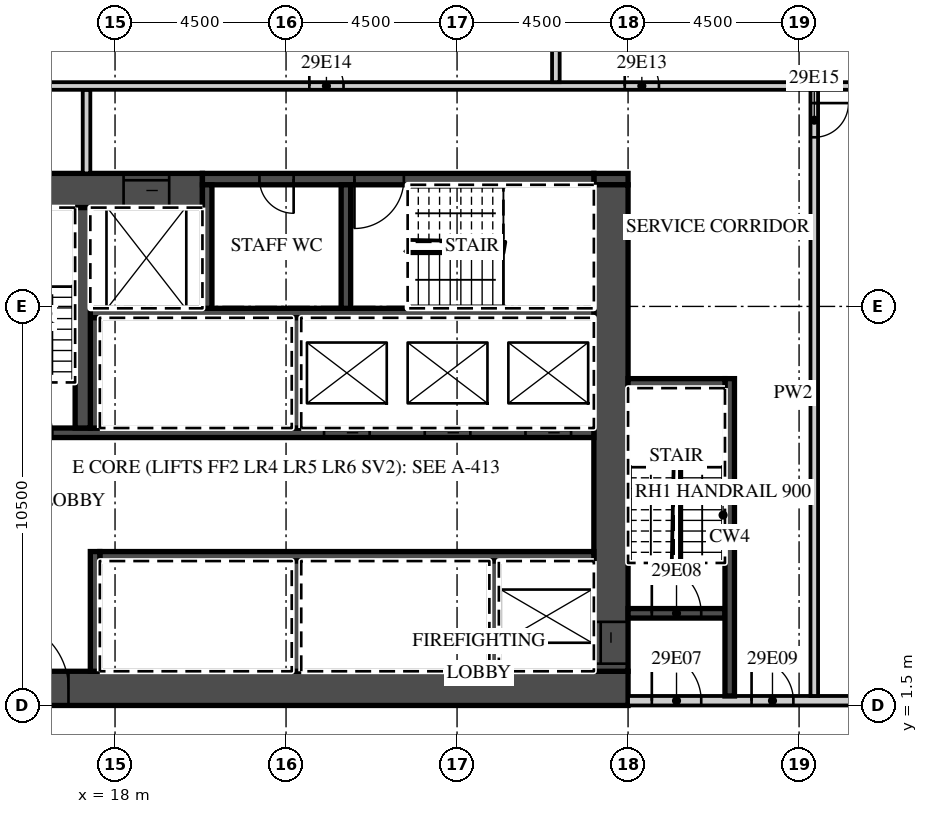
"""IFC4 building model, lengths in metres.
Left out: names, types, materials, properties, quantities, classifications, styles, units other than length and angle.
Written with IfcOpenShell. Run it as: python <this file> out.ifc"""

import sys

from ifc_helpers import new_model, si_unit, direction, frame, frame_2d, origin, place, context, subcontext, project, spatial, rectangle, extrude, element, fill, save


model = new_model("IFC4")
c1 = context("Model", 3, precision=1e-05, world=origin(), true_north=direction((0.0, 1.0)))
c2 = subcontext(c1, "Body", "Model", "MODEL_VIEW")
j1 = project(units=[si_unit("LENGTHUNIT", "METRE"), si_unit("PLANEANGLEUNIT", "RADIAN")], contexts=[c1])
p1 = place(None, origin())
s1 = spatial("IfcSite", under=j1, at=p1, CompositionType="ELEMENT")
p2 = place(p1, origin())
s2 = spatial("IfcBuilding", under=s1, at=p2, CompositionType="ELEMENT")
p3 = place(p2, frame((0.0, 0.0, 130.6)))
s3 = spatial("IfcBuildingStorey", under=s2, at=p3, CompositionType="ELEMENT", Elevation=130.6)
p4 = place(p3, frame((13.5, 1.95, 0.0), z_axis=(0.0, 0.0, 1.0), x_axis=(1.0, 0.0, 0.0)))
e1 = element("IfcWall", 1, at=p4, inside=s3, PredefinedType="SHEAR", context=c2, shape_type="SweptSolid", body=[
    extrude(rectangle(XDim=18.0, YDim=0.9, at=frame_2d((9.0, 0.0))), origin(), (0.0, 0.0, 1.0), 3.02),
])
p5 = place(p4, frame((1.475, 0.0, 0.0)))
e2 = element("IfcOpeningElement", 2, at=p5, cuts=e1, PredefinedType="OPENING", context=c2, shape_type="SweptSolid", body=[
    extrude(rectangle(XDim=1.8, YDim=2.1, at=frame_2d((0.9, 1.05))), frame((0.0, 0.46, 0.0), z_axis=(0.0, -1.0, 0.0), x_axis=(1.0, 0.0, 0.0)), (0.0, 0.0, 1.0), 0.92),
])
p6 = place(p3, frame((13.5, 15.05, 0.0), z_axis=(0.0, 0.0, 1.0), x_axis=(1.0, 0.0, 0.0)))
e3 = element("IfcWall", 3, at=p6, inside=s3, PredefinedType="SHEAR", context=c2, shape_type="SweptSolid", body=[
    extrude(rectangle(XDim=6.8, YDim=0.9, at=frame_2d((3.4, 0.0))), origin(), (0.0, 0.0, 1.0), 3.02),
])
p7 = place(p6, frame((4.725, 0.0, 0.0)))
e4 = element("IfcOpeningElement", 4, at=p7, cuts=e3, PredefinedType="OPENING", context=c2, shape_type="SweptSolid", body=[
    extrude(rectangle(XDim=1.2, YDim=2.1, at=frame_2d((0.6, 1.05))), frame((0.0, 0.46, 0.0), z_axis=(0.0, -1.0, 0.0), x_axis=(1.0, 0.0, 0.0)), (0.0, 0.0, 1.0), 0.92),
])
p8 = place(p3, frame((30.6, 15.35, 0.0), z_axis=(0.0, 0.0, 1.0), x_axis=(1.0, 0.0, 0.0)))
e5 = element("IfcWall", 5, at=p8, inside=s3, PredefinedType="SHEAR", context=c2, shape_type="SweptSolid", body=[
    extrude(rectangle(XDim=0.9, YDim=0.3, at=frame_2d((0.45, 0.0))), origin(), (0.0, 0.0, 1.0), 3.02),
])
p9 = place(p3, frame((20.3, 15.35, 0.0), z_axis=(0.0, 0.0, 1.0), x_axis=(1.0, 0.0, 0.0)))
e6 = element("IfcWall", 6, at=p9, inside=s3, PredefinedType="SHEAR", context=c2, shape_type="SweptSolid", body=[
    extrude(rectangle(XDim=10.3, YDim=0.3, at=frame_2d((5.15, 0.0))), origin(), (0.0, 0.0, 1.0), 3.02),
])
p10 = place(p9, frame((4.0, 0.0, 0.0)))
e7 = element("IfcOpeningElement", 7, at=p10, cuts=e6, PredefinedType="OPENING", context=c2, shape_type="SweptSolid", body=[
    extrude(rectangle(XDim=1.3, YDim=2.1, at=frame_2d((0.65, 1.05))), frame((0.0, 0.16, 0.0), z_axis=(0.0, -1.0, 0.0), x_axis=(1.0, 0.0, 0.0)), (0.0, 0.0, 1.0), 0.32),
])
p11 = place(p9, frame((1.5, 0.0, 0.0)))
e8 = element("IfcOpeningElement", 8, at=p11, cuts=e6, PredefinedType="OPENING", context=c2, shape_type="SweptSolid", body=[
    extrude(rectangle(XDim=0.9, YDim=2.1, at=frame_2d((0.45, 1.05))), frame((0.0, 0.16, 0.0), z_axis=(0.0, -1.0, 0.0), x_axis=(1.0, 0.0, 0.0)), (0.0, 0.0, 1.0), 0.32),
])
p12 = place(p3, frame((31.05, 2.4, 0.0), z_axis=(0.0, 0.0, 1.0), x_axis=(0.0, 1.0, 0.0)))
e9 = element("IfcWall", 9, at=p12, inside=s3, PredefinedType="SHEAR", context=c2, shape_type="SweptSolid", body=[
    extrude(rectangle(XDim=12.8, YDim=0.9, at=frame_2d((6.4, 0.0))), origin(), (0.0, 0.0, 1.0), 3.02),
])
p13 = place(p12, frame((0.2, 0.0, 0.0)))
e10 = element("IfcOpeningElement", 10, at=p13, cuts=e9, PredefinedType="OPENING", context=c2, shape_type="SweptSolid", body=[
    extrude(rectangle(XDim=1.1, YDim=2.1, at=frame_2d((0.55, 1.05))), frame((0.0, 0.46, 0.0), z_axis=(0.0, -1.0, 0.0), x_axis=(1.0, 0.0, 0.0)), (0.0, 0.0, 1.0), 0.92),
])
p14 = place(p3, frame((17.6, 5.425, 0.0), z_axis=(0.0, 0.0, 1.0), x_axis=(1.0, 0.0, 0.0)))
e11 = element("IfcWall", 11, at=p14, inside=s3, PredefinedType="SHEAR", context=c2, shape_type="SweptSolid", body=[
    extrude(rectangle(XDim=13.0, YDim=0.25, at=frame_2d((6.5, 0.0))), origin(), (0.0, 0.0, 1.0), 3.02),
])
p15 = place(p3, frame((17.475, 2.4, 0.0), z_axis=(0.0, 0.0, 1.0), x_axis=(0.0, 1.0, 0.0)))
e12 = element("IfcWall", 12, at=p15, inside=s3, PredefinedType="SHEAR", context=c2, shape_type="SweptSolid", body=[
    extrude(rectangle(XDim=3.15, YDim=0.25, at=frame_2d((1.575, 0.0))), origin(), (0.0, 0.0, 1.0), 3.02),
])
for number, where, z_axis, x_axis in (
    (13, (27.975, 2.4, 0.0), (0.0, 0.0, 1.0), (0.0, 1.0, 0.0)),
    (14, (22.775, 2.4, 0.0), (0.0, 0.0, 1.0), (0.0, 1.0, 0.0)),
):
    element("IfcWall", number, at=place(p3, frame(where, z_axis=z_axis, x_axis=x_axis)), inside=s3, PredefinedType="SHEAR", context=c2, shape_type="SweptSolid", body=[
        extrude(rectangle(XDim=2.9, YDim=0.25, at=frame_2d((1.45, 0.0))), origin(), (0.0, 0.0, 1.0), 3.02),
    ])
p16 = place(p3, frame((14.4, 8.675, 0.0), z_axis=(0.0, 0.0, 1.0), x_axis=(1.0, 0.0, 0.0)))
e15 = element("IfcWall", 15, at=p16, inside=s3, PredefinedType="SHEAR", context=c2, shape_type="SweptSolid", body=[
    extrude(rectangle(XDim=16.2, YDim=0.25, at=frame_2d((8.1, 0.0))), origin(), (0.0, 0.0, 1.0), 3.02),
])
p17 = place(p16, frame((14.4, 0.0, 0.0)))
e16 = element("IfcOpeningElement", 16, at=p17, cuts=e15, PredefinedType="OPENING", context=c2, shape_type="SweptSolid", body=[
    extrude(rectangle(XDim=1.2, YDim=2.1, at=frame_2d((0.6, 1.05))), frame((0.0, 0.135, 0.0), z_axis=(0.0, -1.0, 0.0), x_axis=(1.0, 0.0, 0.0)), (0.0, 0.0, 1.0), 0.27),
])
p18 = place(p16, frame((11.75, 0.0, 0.0)))
e17 = element("IfcOpeningElement", 17, at=p18, cuts=e15, PredefinedType="OPENING", context=c2, shape_type="SweptSolid", body=[
    extrude(rectangle(XDim=1.2, YDim=2.1, at=frame_2d((0.6, 1.05))), frame((0.0, 0.135, 0.0), z_axis=(0.0, -1.0, 0.0), x_axis=(1.0, 0.0, 0.0)), (0.0, 0.0, 1.0), 0.27),
])
p19 = place(p16, frame((9.1, 0.0, 0.0)))
e18 = element("IfcOpeningElement", 18, at=p19, cuts=e15, PredefinedType="OPENING", context=c2, shape_type="SweptSolid", body=[
    extrude(rectangle(XDim=1.2, YDim=2.1, at=frame_2d((0.6, 1.05))), frame((0.0, 0.135, 0.0), z_axis=(0.0, -1.0, 0.0), x_axis=(1.0, 0.0, 0.0)), (0.0, 0.0, 1.0), 0.27),
])
p20 = place(p16, frame((0.65, 0.0, 0.0)))
e19 = element("IfcOpeningElement", 19, at=p20, cuts=e15, PredefinedType="OPENING", context=c2, shape_type="SweptSolid", body=[
    extrude(rectangle(XDim=1.3, YDim=2.1, at=frame_2d((0.65, 1.05))), frame((0.0, 0.135, 0.0), z_axis=(0.0, -1.0, 0.0), x_axis=(1.0, 0.0, 0.0)), (0.0, 0.0, 1.0), 0.27),
])
p21 = place(p3, frame((17.35, 11.825, 0.0), z_axis=(0.0, 0.0, 1.0), x_axis=(1.0, 0.0, 0.0)))
e20 = element("IfcWall", 20, at=p21, inside=s3, PredefinedType="SHEAR", context=c2, shape_type="SweptSolid", body=[
    extrude(rectangle(XDim=13.25, YDim=0.25, at=frame_2d((6.625, 0.0))), origin(), (0.0, 0.0, 1.0), 3.02),
])
for number, where, z_axis, x_axis in (
    (21, (17.475, 8.8, 0.0), (0.0, 0.0, 1.0), (0.0, 1.0, 0.0)),
    (22, (22.775, 8.8, 0.0), (0.0, 0.0, 1.0), (0.0, 1.0, 0.0)),
):
    element("IfcWall", number, at=place(p3, frame(where, z_axis=z_axis, x_axis=x_axis)), inside=s3, PredefinedType="SHEAR", context=c2, shape_type="SweptSolid", body=[
        extrude(rectangle(XDim=2.9, YDim=0.25, at=frame_2d((1.45, 0.0))), origin(), (0.0, 0.0, 1.0), 3.02),
    ])
p22 = place(p3, frame((17.15, 8.8, 0.0), z_axis=(0.0, 0.0, 1.0), x_axis=(0.0, 1.0, 0.0)))
e23 = element("IfcWall", 23, at=p22, inside=s3, PredefinedType="SHEAR", context=c2, shape_type="SweptSolid", body=[
    extrude(rectangle(XDim=5.8, YDim=0.4, at=frame_2d((2.9, 0.0))), origin(), (0.0, 0.0, 1.0), 3.02),
])
for number, where, z_axis, x_axis in (
    (24, (20.425, 11.95, 0.0), (0.0, 0.0, 1.0), (0.0, 1.0, 0.0)),
    (25, (24.075, 11.95, 0.0), (0.0, 0.0, 1.0), (0.0, 1.0, 0.0)),
):
    element("IfcWall", number, at=place(p3, frame(where, z_axis=z_axis, x_axis=x_axis)), inside=s3, PredefinedType="SHEAR", context=c2, shape_type="SweptSolid", body=[
        extrude(rectangle(XDim=3.25, YDim=0.25, at=frame_2d((1.625, 0.0))), origin(), (0.0, 0.0, 1.0), 3.02),
    ])
p23 = place(p3, frame((31.5, 1.625, 0.0), z_axis=(0.0, 0.0, 1.0), x_axis=(1.0, 0.0, 0.0)))
e26 = element("IfcWall", 26, at=p23, inside=s3, PredefinedType="PARTITIONING", context=c2, shape_type="SweptSolid", body=[
    extrude(rectangle(XDim=15.65, YDim=0.25, at=frame_2d((7.825, 0.0))), origin(), (0.0, 0.0, 1.0), 3.02),
])
p24 = place(p23, frame((0.625, 0.0, 0.0)))
e27 = element("IfcOpeningElement", 27, at=p24, cuts=e26, PredefinedType="OPENING", context=c2, shape_type="SweptSolid", body=[
    extrude(rectangle(XDim=1.3, YDim=2.1, at=frame_2d((0.65, 1.05))), frame((0.0, 0.135, 0.0), z_axis=(0.0, -1.0, 0.0), x_axis=(1.0, 0.0, 0.0)), (0.0, 0.0, 1.0), 0.27),
])
p25 = place(p23, frame((3.25, 0.0, 0.0)))
e28 = element("IfcOpeningElement", 28, at=p25, cuts=e26, PredefinedType="OPENING", context=c2, shape_type="SweptSolid", body=[
    extrude(rectangle(XDim=1.1, YDim=2.1, at=frame_2d((0.55, 1.05))), frame((0.0, 0.135, 0.0), z_axis=(0.0, -1.0, 0.0), x_axis=(1.0, 0.0, 0.0)), (0.0, 0.0, 1.0), 0.27),
])
p26 = place(p3, frame((31.5, 3.925, 0.0), z_axis=(0.0, 0.0, 1.0), x_axis=(1.0, 0.0, 0.0)))
e29 = element("IfcWall", 29, at=p26, inside=s3, PredefinedType="SHEAR", context=c2, shape_type="SweptSolid", body=[
    extrude(rectangle(XDim=2.55, YDim=0.25, at=frame_2d((1.275, 0.0))), origin(), (0.0, 0.0, 1.0), 3.02),
])
p27 = place(p26, frame((0.625, 0.0, 0.0)))
e30 = element("IfcOpeningElement", 30, at=p27, cuts=e29, PredefinedType="OPENING", context=c2, shape_type="SweptSolid", body=[
    extrude(rectangle(XDim=1.3, YDim=2.1, at=frame_2d((0.65, 1.05))), frame((0.0, 0.135, 0.0), z_axis=(0.0, -1.0, 0.0), x_axis=(1.0, 0.0, 0.0)), (0.0, 0.0, 1.0), 0.27),
])
p28 = place(p3, frame((34.175, 1.75, 0.0), z_axis=(0.0, 0.0, 1.0), x_axis=(0.0, 1.0, 0.0)))
e31 = element("IfcWall", 31, at=p28, inside=s3, PredefinedType="SHEAR", context=c2, shape_type="SweptSolid", body=[
    extrude(rectangle(XDim=8.35, YDim=0.25, at=frame_2d((4.175, 0.0))), origin(), (0.0, 0.0, 1.0), 3.02),
])
p29 = place(p3, frame((31.5, 9.975, 0.0), z_axis=(0.0, 0.0, 1.0), x_axis=(1.0, 0.0, 0.0)))
e32 = element("IfcWall", 32, at=p29, inside=s3, PredefinedType="SHEAR", context=c2, shape_type="SweptSolid", body=[
    extrude(rectangle(XDim=2.55, YDim=0.25, at=frame_2d((1.275, 0.0))), origin(), (0.0, 0.0, 1.0), 3.02),
])
p30 = place(p3, frame((17.25, 15.5, 0.0), z_axis=(0.0, 0.0, 1.0), x_axis=(0.0, 1.0, 0.0)))
e33 = element("IfcWall", 33, at=p30, inside=s3, PredefinedType="PARTITIONING", context=c2, shape_type="SweptSolid", body=[
    extrude(rectangle(XDim=2.2, YDim=0.2, at=frame_2d((1.1, 0.0))), origin(), (0.0, 0.0, 1.0), 3.02),
])
p31 = place(p3, frame((36.4, 1.75, 0.0), z_axis=(0.0, 0.0, 1.0), x_axis=(0.0, 1.0, 0.0)))
e34 = element("IfcWall", 34, at=p31, inside=s3, PredefinedType="PARTITIONING", context=c2, shape_type="SweptSolid", body=[
    extrude(rectangle(XDim=15.95, YDim=0.2, at=frame_2d((7.975, 0.0))), origin(), (0.0, 0.0, 1.0), 3.02),
])
p32 = place(p31, frame((14.7, 0.0, 0.0)))
e35 = element("IfcOpeningElement", 35, at=p32, cuts=e34, PredefinedType="OPENING", context=c2, shape_type="SweptSolid", body=[
    extrude(rectangle(XDim=0.9, YDim=2.1, at=frame_2d((0.45, 1.05))), frame((0.0, 0.11, 0.0), z_axis=(0.0, -1.0, 0.0), x_axis=(1.0, 0.0, 0.0)), (0.0, 0.0, 1.0), 0.22),
])
p33 = place(p3, frame((13.6, 17.8, 0.0), z_axis=(0.0, 0.0, 1.0), x_axis=(1.0, 0.0, 0.0)))
e36 = element("IfcWall", 36, at=p33, inside=s3, PredefinedType="PARTITIONING", context=c2, shape_type="SweptSolid", body=[
    extrude(rectangle(XDim=31.993, YDim=0.2, at=frame_2d((15.997, 0.0))), origin(), (0.0, 0.0, 1.0), 3.02),
])
p34 = place(p33, frame((17.812, 0.0, 0.0)))
e37 = element("IfcOpeningElement", 37, at=p34, cuts=e36, PredefinedType="OPENING", context=c2, shape_type="SweptSolid", body=[
    extrude(rectangle(XDim=0.9, YDim=2.1, at=frame_2d((0.45, 1.05))), frame((0.0, 0.11, 0.0), z_axis=(0.0, -1.0, 0.0), x_axis=(1.0, 0.0, 0.0)), (0.0, 0.0, 1.0), 0.22),
])
p35 = place(p33, frame((9.512, 0.0, 0.0)))
e38 = element("IfcOpeningElement", 38, at=p35, cuts=e36, PredefinedType="OPENING", context=c2, shape_type="SweptSolid", body=[
    extrude(rectangle(XDim=0.9, YDim=2.1, at=frame_2d((0.45, 1.05))), frame((0.0, 0.11, 0.0), z_axis=(0.0, -1.0, 0.0), x_axis=(1.0, 0.0, 0.0)), (0.0, 0.0, 1.0), 0.22),
])
p36 = place(p3, frame((29.6, 17.9, 0.0), z_axis=(0.0, 0.0, 1.0), x_axis=(0.0, 1.0, 0.0)))
e39 = element("IfcWall", 39, at=p36, inside=s3, PredefinedType="PARTITIONING", context=c2, shape_type="SweptSolid", body=[
    extrude(rectangle(XDim=6.313, YDim=0.2, at=frame_2d((3.157, 0.0))), origin(), (0.0, 0.0, 1.0), 3.02),
])
p37 = place(p17, origin())
e40 = element("IfcDoor", 40, at=p37, inside=s3, OperationType="SLIDING_TO_LEFT", PredefinedType="DOOR", context=c2, shape_type="SweptSolid", body=[
    extrude(rectangle(XDim=1.2, YDim=2.1, at=frame_2d((0.6, 1.05))), frame((0.0, 0.025, 0.0), z_axis=(0.0, -1.0, 0.0), x_axis=(1.0, 0.0, 0.0)), (0.0, 0.0, 1.0), 0.05),
])
fill(e16, e40)
p38 = place(p18, origin())
e41 = element("IfcDoor", 41, at=p38, inside=s3, OperationType="SLIDING_TO_RIGHT", PredefinedType="DOOR", context=c2, shape_type="SweptSolid", body=[
    extrude(rectangle(XDim=1.2, YDim=2.1, at=frame_2d((0.6, 1.05))), frame((0.0, 0.025, 0.0), z_axis=(0.0, -1.0, 0.0), x_axis=(1.0, 0.0, 0.0)), (0.0, 0.0, 1.0), 0.05),
])
fill(e17, e41)
p39 = place(p19, origin())
e42 = element("IfcDoor", 42, at=p39, inside=s3, OperationType="SLIDING_TO_RIGHT", PredefinedType="DOOR", context=c2, shape_type="SweptSolid", body=[
    extrude(rectangle(XDim=1.2, YDim=2.1, at=frame_2d((0.6, 1.05))), frame((0.0, 0.025, 0.0), z_axis=(0.0, -1.0, 0.0), x_axis=(1.0, 0.0, 0.0)), (0.0, 0.0, 1.0), 0.05),
])
fill(e18, e42)
p40 = place(p7, origin())
e43 = element("IfcDoor", 43, at=p40, inside=s3, OperationType="SLIDING_TO_LEFT", PredefinedType="DOOR", context=c2, shape_type="SweptSolid", body=[
    extrude(rectangle(XDim=1.2, YDim=2.1, at=frame_2d((0.6, 1.05))), frame((0.0, 0.025, 0.0), z_axis=(0.0, -1.0, 0.0), x_axis=(1.0, 0.0, 0.0)), (0.0, 0.0, 1.0), 0.05),
])
fill(e4, e43)
p41 = place(p13, origin())
e44 = element("IfcDoor", 44, at=p41, inside=s3, OperationType="SLIDING_TO_LEFT", PredefinedType="DOOR", context=c2, shape_type="SweptSolid", body=[
    extrude(rectangle(XDim=1.1, YDim=2.1, at=frame_2d((0.55, 1.05))), frame((0.0, 0.025, 0.0), z_axis=(0.0, -1.0, 0.0), x_axis=(1.0, 0.0, 0.0)), (0.0, 0.0, 1.0), 0.05),
])
fill(e10, e44)
p42 = place(p5, origin())
e45 = element("IfcDoor", 45, at=p42, inside=s3, OperationType="DOUBLE_DOOR_DOUBLE_SWING", PredefinedType="DOOR", context=c2, shape_type="SweptSolid", body=[
    extrude(rectangle(XDim=1.8, YDim=2.1, at=frame_2d((0.9, 1.05))), frame((0.0, 0.025, 0.0), z_axis=(0.0, -1.0, 0.0), x_axis=(1.0, 0.0, 0.0)), (0.0, 0.0, 1.0), 0.05),
])
fill(e2, e45)
p43 = place(p24, origin())
e46 = element("IfcDoor", 46, at=p43, inside=s3, OperationType="SINGLE_SWING_LEFT", PredefinedType="DOOR", context=c2, shape_type="SweptSolid", body=[
    extrude(rectangle(XDim=1.3, YDim=2.1, at=frame_2d((0.65, 1.05))), frame((0.0, 0.025, 0.0), z_axis=(0.0, -1.0, 0.0), x_axis=(1.0, 0.0, 0.0)), (0.0, 0.0, 1.0), 0.05),
])
fill(e27, e46)
p44 = place(p27, origin())
e47 = element("IfcDoor", 47, at=p44, inside=s3, OperationType="SINGLE_SWING_LEFT", PredefinedType="DOOR", context=c2, shape_type="SweptSolid", body=[
    extrude(rectangle(XDim=1.3, YDim=2.1, at=frame_2d((0.65, 1.05))), frame((0.0, 0.025, 0.0), z_axis=(0.0, -1.0, 0.0), x_axis=(1.0, 0.0, 0.0)), (0.0, 0.0, 1.0), 0.05),
])
fill(e30, e47)
p45 = place(p25, origin())
e48 = element("IfcDoor", 48, at=p45, inside=s3, OperationType="SINGLE_SWING_LEFT", PredefinedType="DOOR", context=c2, shape_type="SweptSolid", body=[
    extrude(rectangle(XDim=1.1, YDim=2.1, at=frame_2d((0.55, 1.05))), frame((0.0, 0.025, 0.0), z_axis=(0.0, -1.0, 0.0), x_axis=(1.0, 0.0, 0.0)), (0.0, 0.0, 1.0), 0.05),
])
fill(e28, e48)
p46 = place(p10, origin())
e49 = element("IfcDoor", 49, at=p46, inside=s3, OperationType="SINGLE_SWING_LEFT", PredefinedType="DOOR", context=c2, shape_type="SweptSolid", body=[
    extrude(rectangle(XDim=1.3, YDim=2.1, at=frame_2d((0.65, 1.05))), frame((0.0, 0.025, 0.0), z_axis=(0.0, -1.0, 0.0), x_axis=(1.0, 0.0, 0.0)), (0.0, 0.0, 1.0), 0.05),
])
fill(e7, e49)
p47 = place(p11, origin())
e50 = element("IfcDoor", 50, at=p47, inside=s3, OperationType="SINGLE_SWING_RIGHT", PredefinedType="DOOR", context=c2, shape_type="SweptSolid", body=[
    extrude(rectangle(XDim=0.9, YDim=2.1, at=frame_2d((0.45, 1.05))), frame((0.0, 0.025, 0.0), z_axis=(0.0, -1.0, 0.0), x_axis=(1.0, 0.0, 0.0)), (0.0, 0.0, 1.0), 0.05),
])
fill(e8, e50)
p48 = place(p34, origin())
e51 = element("IfcDoor", 51, at=p48, inside=s3, OperationType="SINGLE_SWING_LEFT", PredefinedType="DOOR", context=c2, shape_type="SweptSolid", body=[
    extrude(rectangle(XDim=0.9, YDim=2.1, at=frame_2d((0.45, 1.05))), frame((0.0, 0.025, 0.0), z_axis=(0.0, -1.0, 0.0), x_axis=(1.0, 0.0, 0.0)), (0.0, 0.0, 1.0), 0.05),
])
fill(e37, e51)
p49 = place(p35, origin())
e52 = element("IfcDoor", 52, at=p49, inside=s3, OperationType="SINGLE_SWING_LEFT", PredefinedType="DOOR", context=c2, shape_type="SweptSolid", body=[
    extrude(rectangle(XDim=0.9, YDim=2.1, at=frame_2d((0.45, 1.05))), frame((0.0, 0.025, 0.0), z_axis=(0.0, -1.0, 0.0), x_axis=(1.0, 0.0, 0.0)), (0.0, 0.0, 1.0), 0.05),
])
fill(e38, e52)
p50 = place(p32, origin())
e53 = element("IfcDoor", 53, at=p50, inside=s3, OperationType="SINGLE_SWING_RIGHT", PredefinedType="DOOR", context=c2, shape_type="SweptSolid", body=[
    extrude(rectangle(XDim=0.9, YDim=2.1, at=frame_2d((0.45, 1.05))), frame((0.0, 0.025, 0.0), z_axis=(0.0, -1.0, 0.0), x_axis=(1.0, 0.0, 0.0)), (0.0, 0.0, 1.0), 0.05),
])
fill(e35, e53)
save(model, sys.argv[1])
